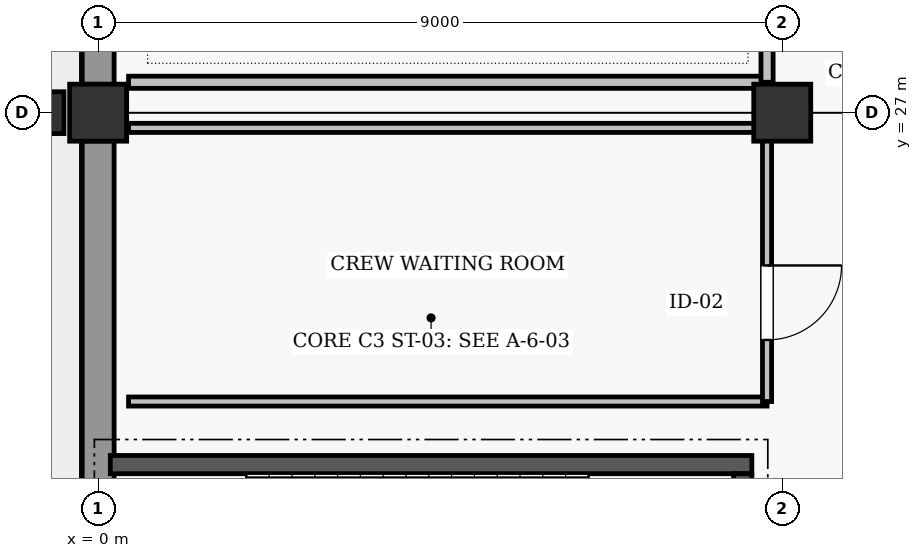
"""IFC4 building model, lengths in metres.
Left out: names, types, materials, properties, quantities, classifications, styles, units other than length and angle.
Written with IfcOpenShell. Run it as: python <this file> out.ifc"""

import sys

from ifc_helpers import new_model, si_unit, direction, frame, frame_2d, origin, origin_2d, place, context, subcontext, project, spatial, rectangle, extrude, element, fill, save


model = new_model("IFC4")
c1 = context("Model", 3, precision=1e-05, world=origin(), true_north=direction((0.0, 1.0)))
c2 = subcontext(c1, "Body", "Model", "MODEL_VIEW")
j1 = project(units=[si_unit("LENGTHUNIT", "METRE"), si_unit("PLANEANGLEUNIT", "RADIAN")], contexts=[c1])
p1 = place(None, origin())
s1 = spatial("IfcSite", under=j1, at=p1, CompositionType="ELEMENT")
p2 = place(p1, origin())
s2 = spatial("IfcBuilding", under=s1, at=p2, CompositionType="ELEMENT")
p3 = place(p2, origin())
s3 = spatial("IfcBuildingStorey", under=s2, at=p3, CompositionType="ELEMENT", Elevation=0.0)
for number, where, z_axis, x_axis in (
    (1, (0.0, 27.0, 0.0), (0.0, 0.0, 1.0), (1.0, 0.0, 0.0)),
    (2, (9.0, 27.0, 0.0), (0.0, 0.0, 1.0), (1.0, 0.0, 0.0)),
):
    element("IfcColumn", number, at=place(p3, frame(where, z_axis=z_axis, x_axis=x_axis)), inside=s3, PredefinedType="COLUMN", context=c2, shape_type="SweptSolid", body=[
        extrude(rectangle(XDim=0.75, YDim=0.75, at=origin_2d()), origin(), (0.0, 0.0, 1.0), 4.8),
    ])
p4 = place(p3, frame((-0.85, 27.0, 0.0), z_axis=(0.0, 0.0, 1.0), x_axis=(0.0, 1.0, 0.0)))
e3 = element("IfcColumn", 3, at=p4, inside=s3, PredefinedType="PILASTER", context=c2, shape_type="SweptSolid", body=[
    extrude(rectangle(XDim=0.55, YDim=0.8, at=origin_2d()), origin(), (0.0, 0.0, 1.0), 4.8),
])
p5 = place(p3, frame((0.0, 18.373, 0.0), z_axis=(0.0, 0.0, 1.0), x_axis=(0.0, 1.0, 0.0)))
e4 = element("IfcWall", 4, at=p5, inside=s3, PredefinedType="SOLIDWALL", context=c2, shape_type="SweptSolid", body=[
    extrude(rectangle(XDim=8.254, YDim=0.42, at=frame_2d((4.127, 0.0))), origin(), (0.0, 0.0, 1.0), 4.042),
])
p6 = place(p5, frame((1.687, 0.0, 0.0)))
e5 = element("IfcOpeningElement", 5, at=p6, cuts=e4, PredefinedType="OPENING", context=c2, shape_type="SweptSolid", body=[
    extrude(rectangle(XDim=1.12, YDim=2.14, at=frame_2d((0.56, 1.07))), frame((0.0, 0.22, 0.0), z_axis=(0.0, -1.0, 0.0), x_axis=(1.0, 0.0, 0.0)), (0.0, 0.0, 1.0), 0.44),
])
p7 = place(p3, frame((0.0, 27.373, 0.0), z_axis=(0.0, 0.0, 1.0), x_axis=(0.0, 1.0, 0.0)))
e6 = element("IfcWall", 6, at=p7, inside=s3, PredefinedType="SOLIDWALL", context=c2, shape_type="SweptSolid", body=[
    extrude(rectangle(XDim=8.254, YDim=0.42, at=frame_2d((4.127, 0.0))), origin(), (0.0, 0.0, 1.0), 4.042),
])
p8 = place(p7, frame((3.302, 0.0, 0.0)))
e7 = element("IfcOpeningElement", 7, at=p8, cuts=e6, PredefinedType="OPENING", context=c2, shape_type="SweptSolid", body=[
    extrude(rectangle(XDim=1.65, YDim=2.28, at=frame_2d((0.825, 1.14))), frame((0.0, 0.22, 0.0), z_axis=(0.0, -1.0, 0.0), x_axis=(1.0, 0.0, 0.0)), (0.0, 0.0, 1.0), 0.44),
])
p9 = place(p3, frame((0.16, 22.37, 0.0), z_axis=(0.0, 0.0, 1.0), x_axis=(1.0, 0.0, 0.0)))
e8 = element("IfcWall", 8, at=p9, inside=s3, PredefinedType="SHEAR", context=c2, shape_type="SweptSolid", body=[
    extrude(rectangle(XDim=8.44, YDim=0.24, at=frame_2d((4.22, 0.0))), origin(), (0.0, 0.0, 1.0), 4.55),
])
p10 = place(p3, frame((8.48, 19.0, 0.0), z_axis=(0.0, 0.0, 1.0), x_axis=(0.0, 1.0, 0.0)))
e9 = element("IfcWall", 9, at=p10, inside=s3, PredefinedType="SHEAR", context=c2, shape_type="SweptSolid", body=[
    extrude(rectangle(XDim=3.25, YDim=0.24, at=frame_2d((1.625, 0.0))), origin(), (0.0, 0.0, 1.0), 4.55),
])
p11 = place(p3, frame((0.4, 23.2, 0.0), z_axis=(0.0, 0.0, 1.0), x_axis=(1.0, 0.0, 0.0)))
e10 = element("IfcWall", 10, at=p11, inside=s3, PredefinedType="PARTITIONING", context=c2, shape_type="SweptSolid", body=[
    extrude(rectangle(XDim=8.4, YDim=0.12, at=frame_2d((4.2, 0.0))), origin(), (0.0, 0.0, 1.0), 3.895),
])
p12 = place(p3, frame((0.4, 26.8, 0.0), z_axis=(0.0, 0.0, 1.0), x_axis=(1.0, 0.0, 0.0)))
e11 = element("IfcWall", 11, at=p12, inside=s3, PredefinedType="PARTITIONING", context=c2, shape_type="SweptSolid", body=[
    extrude(rectangle(XDim=8.4, YDim=0.12, at=frame_2d((4.2, 0.0))), origin(), (0.0, 0.0, 1.0), 3.795),
])
p13 = place(p3, frame((8.8, 23.2, 0.0), z_axis=(0.0, 0.0, 1.0), x_axis=(0.0, 1.0, 0.0)))
e12 = element("IfcWall", 12, at=p13, inside=s3, PredefinedType="PARTITIONING", context=c2, shape_type="SweptSolid", body=[
    extrude(rectangle(XDim=3.6, YDim=0.12, at=frame_2d((1.8, 0.0))), origin(), (0.0, 0.0, 1.0), 3.895),
])
p14 = place(p13, frame((0.81, 0.0, 0.0)))
e13 = element("IfcOpeningElement", 13, at=p14, cuts=e12, PredefinedType="OPENING", context=c2, shape_type="SweptSolid", body=[
    extrude(rectangle(XDim=0.98, YDim=2.08, at=frame_2d((0.49, 1.04))), frame((0.0, 0.07, 0.0), z_axis=(0.0, -1.0, 0.0), x_axis=(1.0, 0.0, 0.0)), (0.0, 0.0, 1.0), 0.14),
])
p15 = place(p3, frame((0.4, 27.4, 0.0), z_axis=(0.0, 0.0, 1.0), x_axis=(1.0, 0.0, 0.0)))
e14 = element("IfcWall", 14, at=p15, inside=s3, PredefinedType="PARTITIONING", context=c2, shape_type="SweptSolid", body=[
    extrude(rectangle(XDim=8.4, YDim=0.16, at=frame_2d((4.2, 0.0))), origin(), (0.0, 0.0, 1.0), 3.895),
])
p16 = place(p3, frame((8.8, 27.4, 0.0), z_axis=(0.0, 0.0, 1.0), x_axis=(0.0, 1.0, 0.0)))
e15 = element("IfcWall", 15, at=p16, inside=s3, PredefinedType="PARTITIONING", context=c2, shape_type="SweptSolid", body=[
    extrude(rectangle(XDim=17.2, YDim=0.16, at=frame_2d((8.6, 0.0))), origin(), (0.0, 0.0, 1.0), 3.895),
])
p17 = place(p16, frame((3.39, 0.0, 0.0)))
e16 = element("IfcOpeningElement", 16, at=p17, cuts=e15, PredefinedType="OPENING", context=c2, shape_type="SweptSolid", body=[
    extrude(rectangle(XDim=1.42, YDim=2.12, at=frame_2d((0.71, 1.06))), frame((0.0, 0.09, 0.0), z_axis=(0.0, -1.0, 0.0), x_axis=(1.0, 0.0, 0.0)), (0.0, 0.0, 1.0), 0.18),
])
p18 = place(p14, frame((0.98, 0.0, 0.0), z_axis=(0.0, 0.0, 1.0), x_axis=(-1.0, 0.0, 0.0)))
e17 = element("IfcDoor", 17, at=p18, inside=s3, OperationType="SINGLE_SWING_RIGHT", PredefinedType="DOOR", context=c2, shape_type="SweptSolid", body=[
    extrude(rectangle(XDim=0.98, YDim=2.08, at=frame_2d((0.49, 1.04))), frame((0.0, 0.025, 0.0), z_axis=(0.0, -1.0, 0.0), x_axis=(1.0, 0.0, 0.0)), (0.0, 0.0, 1.0), 0.05),
])
fill(e13, e17)
save(model, sys.argv[1])
